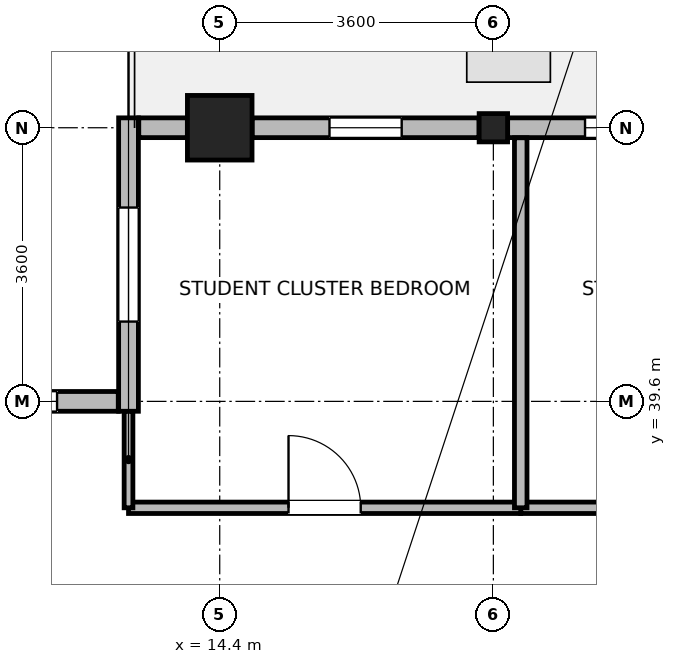
"""IFC4 building model, lengths in metres.
Left out: names, types, materials, properties, quantities, classifications, styles, units other than length and angle.
Written with IfcOpenShell. Run it as: python <this file> out.ifc"""

import sys

from ifc_helpers import new_model, si_unit, direction, frame, frame_2d, origin, origin_2d, place, context, subcontext, project, spatial, rectangle, i_section, extrude, source, transform, mapped, element, fill, save


model = new_model("IFC4")
c1 = context("Model", 3, precision=1e-05, world=origin(), true_north=direction((0.0, 1.0)))
c2 = subcontext(c1, "Body", "Model", "MODEL_VIEW")
j1 = project(units=[si_unit("LENGTHUNIT", "METRE"), si_unit("PLANEANGLEUNIT", "RADIAN")], contexts=[c1])
p1 = place(None, origin())
s1 = spatial("IfcSite", under=j1, at=p1, CompositionType="ELEMENT")
p2 = place(p1, origin())
s2 = spatial("IfcBuilding", under=s1, at=p2, CompositionType="ELEMENT")
p3 = place(p2, frame((0.0, 0.0, 279.5)))
s3 = spatial("IfcBuildingStorey", under=s2, at=p3, CompositionType="ELEMENT", Elevation=279.5)
m1 = source(origin(), c2, "Body", "SweptSolid", [
    extrude(rectangle(XDim=0.85, YDim=0.85, at=origin_2d()), origin(), (0.0, 0.0, 1.0), 3.7),
])
p4 = place(p3, frame((14.4, 43.2, 0.0), z_axis=(0.0, 0.0, 1.0), x_axis=(1.0, 0.0, 0.0)))
e1 = element("IfcColumn", 1, at=p4, inside=s3, PredefinedType="COLUMN", context=c2, shape_type="MappedRepresentation", body=[
    mapped(m1, transform((0.0, 0.0, 0.0), x_axis=(1.0, 0.0, 0.0), y_axis=(0.0, 1.0, 0.0), z_axis=(0.0, 0.0, 1.0), scale=1.0)),
])
m2 = source(origin(), c2, "Body", "SweptSolid", [
    extrude(i_section(OverallWidth=0.374, OverallDepth=0.372, WebThickness=0.015, FlangeThickness=0.026, FilletRadius=0.015, at=origin_2d()), origin(), (0.0, 0.0, 1.0), 3.7),
])
p5 = place(p3, frame((18.0, 43.2, 0.0), z_axis=(0.0, 0.0, 1.0), x_axis=(1.0, 0.0, 0.0)))
e2 = element("IfcColumn", 2, at=p5, inside=s3, PredefinedType="COLUMN", context=c2, shape_type="MappedRepresentation", body=[
    mapped(m2, transform((0.0, 0.0, 0.0), x_axis=(1.0, 0.0, 0.0), y_axis=(0.0, 1.0, 0.0), z_axis=(0.0, 0.0, 1.0), scale=1.0)),
])
p6 = place(p3, frame((18.188, 43.2, 0.0), z_axis=(0.0, 0.0, 1.0), x_axis=(1.0, 0.0, 0.0)))
e3 = element("IfcWall", 3, at=p6, inside=s3, PredefinedType="STANDARD", context=c2, shape_type="SweptSolid", body=[
    extrude(rectangle(XDim=2.986, YDim=0.26, at=frame_2d((1.493, 0.0))), origin(), (0.0, 0.0, 1.0), 3.055),
])
p7 = place(p6, frame((1.018, 0.0, 0.85)))
e4 = element("IfcOpeningElement", 4, at=p7, cuts=e3, PredefinedType="OPENING", context=c2, shape_type="SweptSolid", body=[
    extrude(rectangle(XDim=0.95, YDim=1.75, at=frame_2d((0.475, 0.875))), frame((0.0, 0.14, 0.0), z_axis=(0.0, -1.0, 0.0), x_axis=(1.0, 0.0, 0.0)), (0.0, 0.0, 1.0), 0.28),
])
p8 = place(p3, frame((14.826, 43.2, 0.0), z_axis=(0.0, 0.0, 1.0), x_axis=(1.0, 0.0, 0.0)))
e5 = element("IfcWall", 5, at=p8, inside=s3, PredefinedType="STANDARD", context=c2, shape_type="SweptSolid", body=[
    extrude(rectangle(XDim=2.986, YDim=0.26, at=frame_2d((1.493, 0.0))), origin(), (0.0, 0.0, 1.0), 3.055),
])
p9 = place(p8, frame((1.018, 0.0, 0.85)))
e6 = element("IfcOpeningElement", 6, at=p9, cuts=e5, PredefinedType="OPENING", context=c2, shape_type="SweptSolid", body=[
    extrude(rectangle(XDim=0.95, YDim=1.75, at=frame_2d((0.475, 0.875))), frame((0.0, 0.14, 0.0), z_axis=(0.0, -1.0, 0.0), x_axis=(1.0, 0.0, 0.0)), (0.0, 0.0, 1.0), 0.28),
])
p10 = place(p3, frame((13.335, 43.2, 0.0), z_axis=(0.0, 0.0, 1.0), x_axis=(1.0, 0.0, 0.0)))
e7 = element("IfcWall", 7, at=p10, inside=s3, PredefinedType="STANDARD", context=c2, shape_type="SweptSolid", body=[
    extrude(rectangle(XDim=0.639, YDim=0.26, at=frame_2d((0.32, 0.0))), origin(), (0.0, 0.0, 1.0), 3.455),
])
p11 = place(p3, frame((13.2, 39.47, 0.0), z_axis=(0.0, 0.0, 1.0), x_axis=(0.0, 1.0, 0.0)))
e8 = element("IfcWall", 8, at=p11, inside=s3, PredefinedType="STANDARD", context=c2, shape_type="SweptSolid", body=[
    extrude(rectangle(XDim=3.86, YDim=0.26, at=frame_2d((1.93, 0.0))), origin(), (0.0, 0.0, 1.0), 3.455),
])
p12 = place(p11, frame((1.18, 0.0, 0.85)))
e9 = element("IfcOpeningElement", 9, at=p12, cuts=e8, PredefinedType="OPENING", context=c2, shape_type="SweptSolid", body=[
    extrude(rectangle(XDim=1.5, YDim=1.85, at=frame_2d((0.75, 0.925))), frame((0.0, 0.14, 0.0), z_axis=(0.0, -1.0, 0.0), x_axis=(1.0, 0.0, 0.0)), (0.0, 0.0, 1.0), 0.28),
])
p13 = place(p3, frame((3.735, 39.6, 0.0), z_axis=(0.0, 0.0, 1.0), x_axis=(1.0, 0.0, 0.0)))
e10 = element("IfcWall", 10, at=p13, inside=s3, PredefinedType="STANDARD", context=c2, shape_type="SweptSolid", body=[
    extrude(rectangle(XDim=9.33, YDim=0.26, at=frame_2d((4.665, 0.0))), origin(), (0.0, 0.0, 1.0), 3.455),
])
p14 = place(p13, frame((0.805, 0.0, 0.85)))
e11 = element("IfcOpeningElement", 11, at=p14, cuts=e10, PredefinedType="OPENING", context=c2, shape_type="SweptSolid", body=[
    extrude(rectangle(XDim=1.5, YDim=1.85, at=frame_2d((0.75, 0.925))), frame((0.0, 0.14, 0.0), z_axis=(0.0, -1.0, 0.0), x_axis=(1.0, 0.0, 0.0)), (0.0, 0.0, 1.0), 0.28),
])
p15 = place(p13, frame((3.915, 0.0, 0.85)))
e12 = element("IfcOpeningElement", 12, at=p15, cuts=e10, PredefinedType="OPENING", context=c2, shape_type="SweptSolid", body=[
    extrude(rectangle(XDim=1.5, YDim=1.85, at=frame_2d((0.75, 0.925))), frame((0.0, 0.14, 0.0), z_axis=(0.0, -1.0, 0.0), x_axis=(1.0, 0.0, 0.0)), (0.0, 0.0, 1.0), 0.28),
])
p16 = place(p13, frame((7.025, 0.0, 0.85)))
e13 = element("IfcOpeningElement", 13, at=p16, cuts=e10, PredefinedType="OPENING", context=c2, shape_type="SweptSolid", body=[
    extrude(rectangle(XDim=1.5, YDim=1.85, at=frame_2d((0.75, 0.925))), frame((0.0, 0.14, 0.0), z_axis=(0.0, -1.0, 0.0), x_axis=(1.0, 0.0, 0.0)), (0.0, 0.0, 1.0), 0.28),
])
p17 = place(p3, frame((18.36, 38.2, 0.0), z_axis=(0.0, 0.0, 1.0), x_axis=(1.0, 0.0, 0.0)))
e14 = element("IfcWall", 14, at=p17, inside=s3, PredefinedType="PARTITIONING", context=c2, shape_type="SweptSolid", body=[
    extrude(rectangle(XDim=5.44, YDim=0.15, at=frame_2d((2.72, 0.0))), origin(), (0.0, 0.0, 1.0), 3.455),
])
p18 = place(p17, frame((2.245, 0.0, 0.0)))
e15 = element("IfcOpeningElement", 15, at=p18, cuts=e14, PredefinedType="OPENING", context=c2, shape_type="SweptSolid", body=[
    extrude(rectangle(XDim=0.95, YDim=2.1, at=frame_2d((0.475, 1.05))), frame((0.0, 0.085, 0.0), z_axis=(0.0, -1.0, 0.0), x_axis=(1.0, 0.0, 0.0)), (0.0, 0.0, 1.0), 0.17),
])
p19 = place(p3, frame((13.2, 38.2, 0.0), z_axis=(0.0, 0.0, 1.0), x_axis=(1.0, 0.0, 0.0)))
e16 = element("IfcWall", 16, at=p19, inside=s3, PredefinedType="PARTITIONING", context=c2, shape_type="SweptSolid", body=[
    extrude(rectangle(XDim=5.16, YDim=0.15, at=frame_2d((2.58, 0.0))), origin(), (0.0, 0.0, 1.0), 3.455),
])
p20 = place(p19, frame((2.105, 0.0, 0.0)))
e17 = element("IfcOpeningElement", 17, at=p20, cuts=e16, PredefinedType="OPENING", context=c2, shape_type="SweptSolid", body=[
    extrude(rectangle(XDim=0.95, YDim=2.1, at=frame_2d((0.475, 1.05))), frame((0.0, 0.085, 0.0), z_axis=(0.0, -1.0, 0.0), x_axis=(1.0, 0.0, 0.0)), (0.0, 0.0, 1.0), 0.17),
])
p21 = place(p3, frame((13.2, 38.2, 0.0), z_axis=(0.0, 0.0, 1.0), x_axis=(0.0, 1.0, 0.0)))
e18 = element("IfcWall", 18, at=p21, inside=s3, PredefinedType="PARTITIONING", context=c2, shape_type="SweptSolid", body=[
    extrude(rectangle(XDim=1.268, YDim=0.115, at=frame_2d((0.634, 0.0))), origin(), (0.0, 0.0, 1.0), 3.455),
])
p22 = place(p3, frame((18.36, 38.2, 0.0), z_axis=(0.0, 0.0, 1.0), x_axis=(0.0, 1.0, 0.0)))
e19 = element("IfcWall", 19, at=p22, inside=s3, PredefinedType="PARTITIONING", context=c2, shape_type="SweptSolid", body=[
    extrude(rectangle(XDim=4.868, YDim=0.165, at=frame_2d((2.434, 0.0))), origin(), (0.0, 0.0, 1.0), 3.455),
])
p23 = place(p7, origin())
e20 = element("IfcWindow", 20, at=p23, inside=s3, PartitioningType="SINGLE_PANEL", PredefinedType="WINDOW", context=c2, shape_type="SweptSolid", body=[
    extrude(rectangle(XDim=0.95, YDim=1.75, at=frame_2d((0.475, 0.875))), frame((0.0, 0.03, 0.0), z_axis=(0.0, -1.0, 0.0), x_axis=(1.0, 0.0, 0.0)), (0.0, 0.0, 1.0), 0.06),
])
fill(e4, e20)
p24 = place(p9, origin())
e21 = element("IfcWindow", 21, at=p24, inside=s3, PartitioningType="SINGLE_PANEL", PredefinedType="WINDOW", context=c2, shape_type="SweptSolid", body=[
    extrude(rectangle(XDim=0.95, YDim=1.75, at=frame_2d((0.475, 0.875))), frame((0.0, 0.03, 0.0), z_axis=(0.0, -1.0, 0.0), x_axis=(1.0, 0.0, 0.0)), (0.0, 0.0, 1.0), 0.06),
])
fill(e6, e21)
p25 = place(p12, origin())
e22 = element("IfcWindow", 22, at=p25, inside=s3, PartitioningType="SINGLE_PANEL", PredefinedType="WINDOW", context=c2, shape_type="SweptSolid", body=[
    extrude(rectangle(XDim=1.5, YDim=1.85, at=frame_2d((0.75, 0.925))), frame((0.0, 0.03, 0.0), z_axis=(0.0, -1.0, 0.0), x_axis=(1.0, 0.0, 0.0)), (0.0, 0.0, 1.0), 0.06),
])
fill(e9, e22)
p26 = place(p16, origin())
e23 = element("IfcWindow", 23, at=p26, inside=s3, PartitioningType="SINGLE_PANEL", PredefinedType="WINDOW", context=c2, shape_type="SweptSolid", body=[
    extrude(rectangle(XDim=1.5, YDim=1.85, at=frame_2d((0.75, 0.925))), frame((0.0, 0.03, 0.0), z_axis=(0.0, -1.0, 0.0), x_axis=(1.0, 0.0, 0.0)), (0.0, 0.0, 1.0), 0.06),
])
fill(e13, e23)
p27 = place(p20, origin())
e24 = element("IfcDoor", 24, at=p27, inside=s3, OperationType="SINGLE_SWING_LEFT", PredefinedType="DOOR", context=c2, shape_type="SweptSolid", body=[
    extrude(rectangle(XDim=0.95, YDim=2.1, at=frame_2d((0.475, 1.05))), frame((0.0, 0.025, 0.0), z_axis=(0.0, -1.0, 0.0), x_axis=(1.0, 0.0, 0.0)), (0.0, 0.0, 1.0), 0.05),
])
fill(e17, e24)
save(model, sys.argv[1])
